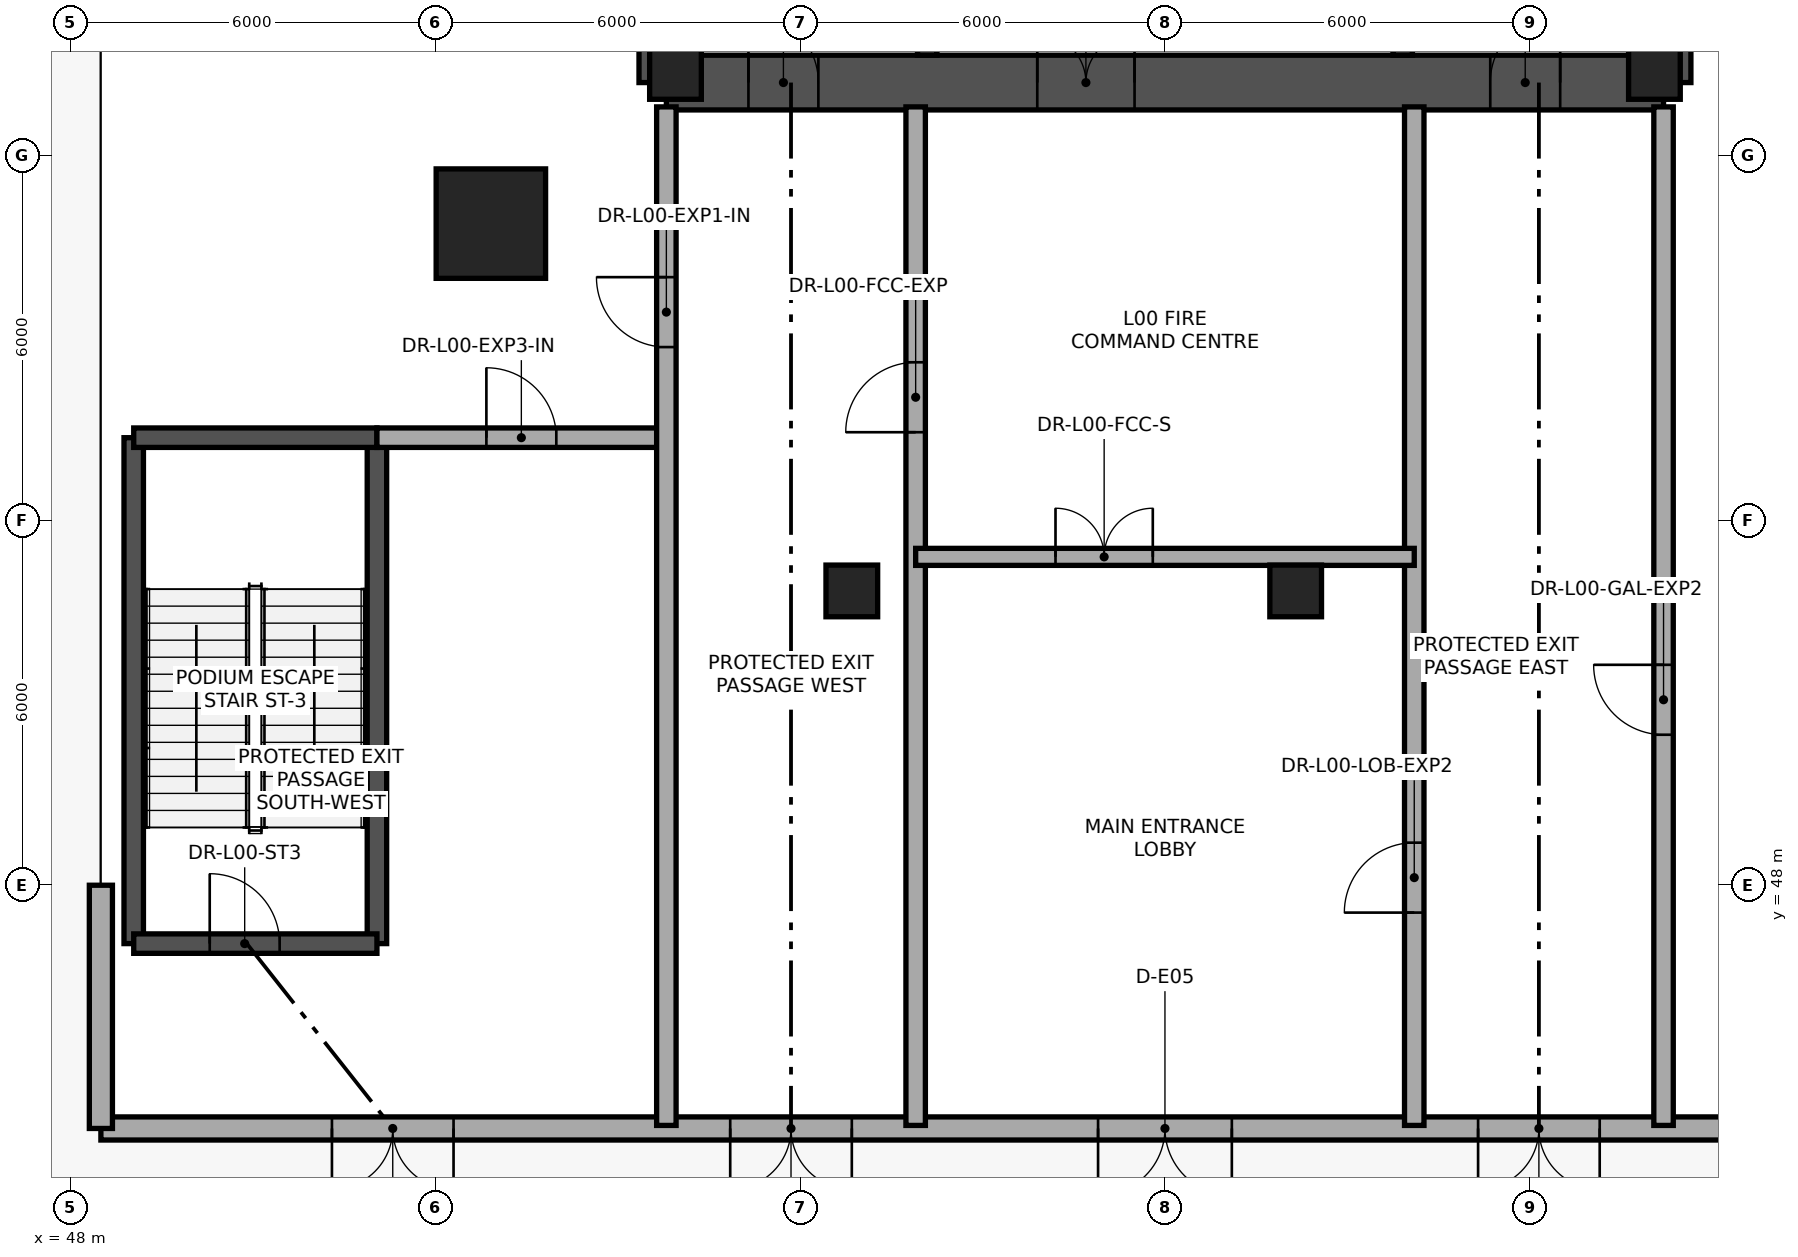
"""IFC4 building model, lengths in metres.
Left out: names, types, materials, properties, quantities, classifications, styles, units other than length and angle.
Written with IfcOpenShell. Run it as: python <this file> out.ifc"""

import sys

from ifc_helpers import new_model, si_unit, direction, frame, frame_2d, origin, origin_2d, place, context, subcontext, project, spatial, rectangle, extrude, element, fill, save


model = new_model("IFC4")
c1 = context("Model", 3, precision=1e-05, world=origin(), true_north=direction((0.0, 1.0)))
c2 = subcontext(c1, "Body", "Model", "MODEL_VIEW")
j1 = project(units=[si_unit("LENGTHUNIT", "METRE"), si_unit("PLANEANGLEUNIT", "RADIAN")], contexts=[c1])
p1 = place(None, origin())
s1 = spatial("IfcSite", under=j1, at=p1, CompositionType="ELEMENT")
p2 = place(p1, origin())
s2 = spatial("IfcBuilding", under=s1, at=p2, CompositionType="ELEMENT")
p3 = place(p2, origin())
s3 = spatial("IfcBuildingStorey", under=s2, at=p3, CompositionType="ELEMENT", Elevation=0.0)
p4 = place(p3, frame((57.8, 61.2, 0.0), z_axis=(0.0, 0.0, 1.0), x_axis=(1.0, 0.0, 0.0)))
e1 = element("IfcWall", 1, at=p4, inside=s3, PredefinedType="SHEAR", context=c2, shape_type="SweptSolid", body=[
    extrude(rectangle(XDim=16.4, YDim=0.9, at=frame_2d((8.2, 0.0))), origin(), (0.0, 0.0, 1.0), 5.4),
])
p5 = place(p4, frame((1.35, 0.0, 0.0)))
e2 = element("IfcOpeningElement", 2, at=p5, cuts=e1, PredefinedType="OPENING", context=c2, shape_type="SweptSolid", body=[
    extrude(rectangle(XDim=1.15, YDim=2.15, at=frame_2d((0.575, 1.075))), frame((0.0, 0.46, 0.0), z_axis=(0.0, -1.0, 0.0), x_axis=(1.0, 0.0, 0.0)), (0.0, 0.0, 1.0), 0.92),
])
p6 = place(p4, frame((6.1, 0.0, 0.0)))
e3 = element("IfcOpeningElement", 3, at=p6, cuts=e1, PredefinedType="OPENING", context=c2, shape_type="SweptSolid", body=[
    extrude(rectangle(XDim=1.6, YDim=2.15, at=frame_2d((0.8, 1.075))), frame((0.0, 0.46, 0.0), z_axis=(0.0, -1.0, 0.0), x_axis=(1.0, 0.0, 0.0)), (0.0, 0.0, 1.0), 0.92),
])
p7 = place(p4, frame((13.55, 0.0, 0.0)))
e4 = element("IfcOpeningElement", 4, at=p7, cuts=e1, PredefinedType="OPENING", context=c2, shape_type="SweptSolid", body=[
    extrude(rectangle(XDim=1.15, YDim=2.15, at=frame_2d((0.575, 1.075))), frame((0.0, 0.46, 0.0), z_axis=(0.0, -1.0, 0.0), x_axis=(1.0, 0.0, 0.0)), (0.0, 0.0, 1.0), 0.92),
])
p8 = place(p3, frame((74.2, 61.2, 0.0), z_axis=(0.0, 0.0, 1.0), x_axis=(0.0, 1.0, 0.0)))
e5 = element("IfcWall", 5, at=p8, inside=s3, PredefinedType="SHEAR", context=c2, shape_type="SweptSolid", body=[
    extrude(rectangle(XDim=13.6, YDim=0.9, at=frame_2d((6.8, 0.0))), origin(), (0.0, 0.0, 1.0), 5.4),
])
p9 = place(p3, frame((57.8, 74.8, 0.0), z_axis=(0.0, 0.0, 1.0), x_axis=(0.0, -1.0, 0.0)))
e6 = element("IfcWall", 6, at=p9, inside=s3, PredefinedType="SHEAR", context=c2, shape_type="SweptSolid", body=[
    extrude(rectangle(XDim=13.6, YDim=0.9, at=frame_2d((6.8, 0.0))), origin(), (0.0, 0.0, 1.0), 5.4),
])
p10 = place(p9, frame((0.85, 0.0, 0.0)))
e7 = element("IfcOpeningElement", 7, at=p10, cuts=e6, PredefinedType="OPENING", context=c2, shape_type="SweptSolid", body=[
    extrude(rectangle(XDim=0.92, YDim=2.05, at=frame_2d((0.46, 1.025))), frame((0.0, 0.46, 0.0), z_axis=(0.0, -1.0, 0.0), x_axis=(1.0, 0.0, 0.0)), (0.0, 0.0, 1.0), 0.92),
])
p11 = place(p9, frame((2.55, 0.0, 0.0)))
e8 = element("IfcOpeningElement", 8, at=p11, cuts=e6, PredefinedType="OPENING", context=c2, shape_type="SweptSolid", body=[
    extrude(rectangle(XDim=1.6, YDim=2.3, at=frame_2d((0.8, 1.15))), frame((0.0, 0.46, 0.0), z_axis=(0.0, -1.0, 0.0), x_axis=(1.0, 0.0, 0.0)), (0.0, 0.0, 1.0), 0.92),
])
p12 = place(p3, frame((62.09, 61.65, 0.0), z_axis=(0.0, 0.0, 1.0), x_axis=(0.0, 1.0, 0.0)))
e9 = element("IfcWall", 9, at=p12, inside=s3, PredefinedType="SHEAR", context=c2, shape_type="SweptSolid", body=[
    extrude(rectangle(XDim=12.7, YDim=0.32, at=frame_2d((6.35, 0.0))), origin(), (0.0, 0.0, 1.0), 5.4),
])
p13 = place(p12, frame((0.55, 0.0, 0.0)))
e10 = element("IfcOpeningElement", 10, at=p13, cuts=e9, PredefinedType="OPENING", context=c2, shape_type="SweptSolid", body=[
    extrude(rectangle(XDim=1.15, YDim=2.15, at=frame_2d((0.575, 1.075))), frame((0.0, 0.17, 0.0), z_axis=(0.0, -1.0, 0.0), x_axis=(1.0, 0.0, 0.0)), (0.0, 0.0, 1.0), 0.34),
])
p14 = place(p3, frame((69.91, 61.65, 0.0), z_axis=(0.0, 0.0, 1.0), x_axis=(0.0, 1.0, 0.0)))
e11 = element("IfcWall", 11, at=p14, inside=s3, PredefinedType="SHEAR", context=c2, shape_type="SweptSolid", body=[
    extrude(rectangle(XDim=12.7, YDim=0.32, at=frame_2d((6.35, 0.0))), origin(), (0.0, 0.0, 1.0), 5.4),
])
p15 = place(p14, frame((8.75, 0.0, 0.0)))
e12 = element("IfcOpeningElement", 12, at=p15, cuts=e11, PredefinedType="OPENING", context=c2, shape_type="SweptSolid", body=[
    extrude(rectangle(XDim=0.92, YDim=2.05, at=frame_2d((0.46, 1.025))), frame((0.0, 0.17, 0.0), z_axis=(0.0, -1.0, 0.0), x_axis=(1.0, 0.0, 0.0)), (0.0, 0.0, 1.0), 0.34),
])
for number, where, z_axis, x_axis in (
    (13, (49.04, 47.04, 0.0), (0.0, 0.0, 1.0), (0.0, 1.0, 0.0)),
    (14, (53.04, 47.04, 0.0), (0.0, 0.0, 1.0), (0.0, 1.0, 0.0)),
):
    element("IfcWall", number, at=place(p3, frame(where, z_axis=z_axis, x_axis=x_axis)), inside=s3, PredefinedType="SHEAR", context=c2, shape_type="SweptSolid", body=[
        extrude(rectangle(XDim=8.32, YDim=0.32, at=frame_2d((4.16, 0.0))), origin(), (0.0, 0.0, 1.0), 5.4),
    ])
p16 = place(p3, frame((49.04, 55.36, 0.0), z_axis=(0.0, 0.0, 1.0), x_axis=(1.0, 0.0, 0.0)))
e15 = element("IfcWall", 15, at=p16, inside=s3, PredefinedType="SHEAR", context=c2, shape_type="SweptSolid", body=[
    extrude(rectangle(XDim=4.0, YDim=0.32, at=frame_2d((2.0, 0.0))), origin(), (0.0, 0.0, 1.0), 5.4),
])
p17 = place(p3, frame((49.04, 47.04, 0.0), z_axis=(0.0, 0.0, 1.0), x_axis=(1.0, 0.0, 0.0)))
e16 = element("IfcWall", 16, at=p17, inside=s3, PredefinedType="SHEAR", context=c2, shape_type="SweptSolid", body=[
    extrude(rectangle(XDim=4.0, YDim=0.32, at=frame_2d((2.0, 0.0))), origin(), (0.0, 0.0, 1.0), 5.4),
])
p18 = place(p17, frame((1.25, 0.0, 0.0)))
e17 = element("IfcOpeningElement", 17, at=p18, cuts=e16, PredefinedType="OPENING", context=c2, shape_type="SweptSolid", body=[
    extrude(rectangle(XDim=1.15, YDim=2.15, at=frame_2d((0.575, 1.075))), frame((0.0, 0.17, 0.0), z_axis=(0.0, -1.0, 0.0), x_axis=(1.0, 0.0, 0.0)), (0.0, 0.0, 1.0), 0.34),
])
for number, where, z_axis, x_axis in (
    (18, (57.95, 61.35, 0.0), (0.0, 0.0, 1.0), (1.0, 0.0, 0.0)),
    (19, (74.05, 61.35, 0.0), (0.0, 0.0, 1.0), (1.0, 0.0, 0.0)),
    (20, (60.85, 52.84, 0.0), (0.0, 0.0, 1.0), (1.0, 0.0, 0.0)),
    (21, (68.15, 52.84, 0.0), (0.0, 0.0, 1.0), (1.0, 0.0, 0.0)),
):
    element("IfcColumn", number, at=place(p3, frame(where, z_axis=z_axis, x_axis=x_axis)), inside=s3, PredefinedType="COLUMN", context=c2, shape_type="SweptSolid", body=[
        extrude(rectangle(XDim=0.85, YDim=0.85, at=origin_2d()), origin(), (0.0, 0.0, 1.0), 5.4),
    ])
p19 = place(p3, frame((54.914, 58.88, 0.0), z_axis=(0.0, 0.0, 1.0), x_axis=(1.0, 0.0, 0.0)))
e22 = element("IfcColumn", 22, at=p19, inside=s3, PredefinedType="COLUMN", context=c2, shape_type="SweptSolid", body=[
    extrude(rectangle(XDim=1.8, YDim=1.8, at=origin_2d()), origin(), (0.0, 0.0, 1.0), 5.4),
])
p20 = place(p3, frame((83.5, 44.0, 0.0), z_axis=(0.0, 0.0, 1.0), x_axis=(-1.0, 0.0, 0.0)))
e23 = element("IfcWall", 23, at=p20, inside=s3, PredefinedType="STANDARD", context=c2, shape_type="SweptSolid", body=[
    extrude(rectangle(XDim=35.0, YDim=0.38, at=frame_2d((17.5, 0.0))), origin(), (0.0, 0.0, 1.0), 4.08),
])
p21 = place(p20, frame((3.5, 0.0, 0.0)))
e24 = element("IfcOpeningElement", 24, at=p21, cuts=e23, PredefinedType="OPENING", context=c2, shape_type="SweptSolid", body=[
    extrude(rectangle(XDim=2.0, YDim=2.25, at=frame_2d((1.0, 1.125))), frame((0.0, 0.2, 0.0), z_axis=(0.0, -1.0, 0.0), x_axis=(1.0, 0.0, 0.0)), (0.0, 0.0, 1.0), 0.4),
])
p22 = place(p20, frame((10.35, 0.0, 0.0)))
e25 = element("IfcOpeningElement", 25, at=p22, cuts=e23, PredefinedType="OPENING", context=c2, shape_type="SweptSolid", body=[
    extrude(rectangle(XDim=2.0, YDim=2.25, at=frame_2d((1.0, 1.125))), frame((0.0, 0.2, 0.0), z_axis=(0.0, -1.0, 0.0), x_axis=(1.0, 0.0, 0.0)), (0.0, 0.0, 1.0), 0.4),
])
p23 = place(p20, frame((16.4, 0.0, 0.0)))
e26 = element("IfcOpeningElement", 26, at=p23, cuts=e23, PredefinedType="OPENING", context=c2, shape_type="SweptSolid", body=[
    extrude(rectangle(XDim=2.2, YDim=2.6, at=frame_2d((1.1, 1.3))), frame((0.0, 0.2, 0.0), z_axis=(0.0, -1.0, 0.0), x_axis=(1.0, 0.0, 0.0)), (0.0, 0.0, 1.0), 0.4),
])
p24 = place(p20, frame((22.65, 0.0, 0.0)))
e27 = element("IfcOpeningElement", 27, at=p24, cuts=e23, PredefinedType="OPENING", context=c2, shape_type="SweptSolid", body=[
    extrude(rectangle(XDim=2.0, YDim=2.25, at=frame_2d((1.0, 1.125))), frame((0.0, 0.2, 0.0), z_axis=(0.0, -1.0, 0.0), x_axis=(1.0, 0.0, 0.0)), (0.0, 0.0, 1.0), 0.4),
])
p25 = place(p20, frame((29.2, 0.0, 0.0)))
e28 = element("IfcOpeningElement", 28, at=p25, cuts=e23, PredefinedType="OPENING", context=c2, shape_type="SweptSolid", body=[
    extrude(rectangle(XDim=2.0, YDim=2.25, at=frame_2d((1.0, 1.125))), frame((0.0, 0.2, 0.0), z_axis=(0.0, -1.0, 0.0), x_axis=(1.0, 0.0, 0.0)), (0.0, 0.0, 1.0), 0.4),
])
p26 = place(p3, frame((48.5, 44.0, 0.0), z_axis=(0.0, 0.0, 1.0), x_axis=(0.0, 1.0, 0.0)))
e29 = element("IfcWall", 29, at=p26, inside=s3, PredefinedType="STANDARD", context=c2, shape_type="SweptSolid", body=[
    extrude(rectangle(XDim=4.0, YDim=0.38, at=frame_2d((2.0, 0.0))), origin(), (0.0, 0.0, 1.0), 4.03),
])
p27 = place(p3, frame((53.04, 55.36, 0.0), z_axis=(0.0, 0.0, 1.0), x_axis=(1.0, 0.0, 0.0)))
e30 = element("IfcWall", 30, at=p27, inside=s3, PredefinedType="STANDARD", context=c2, shape_type="SweptSolid", body=[
    extrude(rectangle(XDim=4.76, YDim=0.32, at=frame_2d((2.38, 0.0))), origin(), (0.0, 0.0, 1.0), 4.08),
])
p28 = place(p27, frame((1.8, 0.0, 0.0)))
e31 = element("IfcOpeningElement", 31, at=p28, cuts=e30, PredefinedType="OPENING", context=c2, shape_type="SweptSolid", body=[
    extrude(rectangle(XDim=1.15, YDim=2.15, at=frame_2d((0.575, 1.075))), frame((0.0, 0.17, 0.0), z_axis=(0.0, -1.0, 0.0), x_axis=(1.0, 0.0, 0.0)), (0.0, 0.0, 1.0), 0.34),
])
p29 = place(p3, frame((57.8, 44.05, 0.0), z_axis=(0.0, 0.0, 1.0), x_axis=(0.0, 1.0, 0.0)))
e32 = element("IfcWall", 32, at=p29, inside=s3, PredefinedType="STANDARD", context=c2, shape_type="SweptSolid", body=[
    extrude(rectangle(XDim=16.75, YDim=0.32, at=frame_2d((8.375, 0.0))), origin(), (0.0, 0.0, 1.0), 4.08),
])
p30 = place(p29, frame((12.8, 0.0, 0.0)))
e33 = element("IfcOpeningElement", 33, at=p30, cuts=e32, PredefinedType="OPENING", context=c2, shape_type="SweptSolid", body=[
    extrude(rectangle(XDim=1.15, YDim=2.15, at=frame_2d((0.575, 1.075))), frame((0.0, 0.17, 0.0), z_axis=(0.0, -1.0, 0.0), x_axis=(1.0, 0.0, 0.0)), (0.0, 0.0, 1.0), 0.34),
])
p31 = place(p3, frame((61.9, 44.05, 0.0), z_axis=(0.0, 0.0, 1.0), x_axis=(0.0, 1.0, 0.0)))
e34 = element("IfcWall", 34, at=p31, inside=s3, PredefinedType="STANDARD", context=c2, shape_type="SweptSolid", body=[
    extrude(rectangle(XDim=16.75, YDim=0.32, at=frame_2d((8.375, 0.0))), origin(), (0.0, 0.0, 1.0), 4.08),
])
p32 = place(p31, frame((11.4, 0.0, 0.0)))
e35 = element("IfcOpeningElement", 35, at=p32, cuts=e34, PredefinedType="OPENING", context=c2, shape_type="SweptSolid", body=[
    extrude(rectangle(XDim=1.15, YDim=2.15, at=frame_2d((0.575, 1.075))), frame((0.0, 0.17, 0.0), z_axis=(0.0, -1.0, 0.0), x_axis=(1.0, 0.0, 0.0)), (0.0, 0.0, 1.0), 0.34),
])
p33 = place(p3, frame((70.1, 44.05, 0.0), z_axis=(0.0, 0.0, 1.0), x_axis=(0.0, 1.0, 0.0)))
e36 = element("IfcWall", 36, at=p33, inside=s3, PredefinedType="STANDARD", context=c2, shape_type="SweptSolid", body=[
    extrude(rectangle(XDim=16.75, YDim=0.32, at=frame_2d((8.375, 0.0))), origin(), (0.0, 0.0, 1.0), 4.08),
])
p34 = place(p33, frame((3.5, 0.0, 0.0)))
e37 = element("IfcOpeningElement", 37, at=p34, cuts=e36, PredefinedType="OPENING", context=c2, shape_type="SweptSolid", body=[
    extrude(rectangle(XDim=1.15, YDim=2.15, at=frame_2d((0.575, 1.075))), frame((0.0, 0.17, 0.0), z_axis=(0.0, -1.0, 0.0), x_axis=(1.0, 0.0, 0.0)), (0.0, 0.0, 1.0), 0.34),
])
p35 = place(p3, frame((74.2, 44.05, 0.0), z_axis=(0.0, 0.0, 1.0), x_axis=(0.0, 1.0, 0.0)))
e38 = element("IfcWall", 38, at=p35, inside=s3, PredefinedType="STANDARD", context=c2, shape_type="SweptSolid", body=[
    extrude(rectangle(XDim=16.75, YDim=0.32, at=frame_2d((8.375, 0.0))), origin(), (0.0, 0.0, 1.0), 4.08),
])
p36 = place(p35, frame((6.425, 0.0, 0.0)))
e39 = element("IfcOpeningElement", 39, at=p36, cuts=e38, PredefinedType="OPENING", context=c2, shape_type="SweptSolid", body=[
    extrude(rectangle(XDim=1.15, YDim=2.15, at=frame_2d((0.575, 1.075))), frame((0.0, 0.17, 0.0), z_axis=(0.0, -1.0, 0.0), x_axis=(1.0, 0.0, 0.0)), (0.0, 0.0, 1.0), 0.34),
])
p37 = place(p3, frame((61.9, 53.4, 0.0), z_axis=(0.0, 0.0, 1.0), x_axis=(1.0, 0.0, 0.0)))
e40 = element("IfcWall", 40, at=p37, inside=s3, PredefinedType="STANDARD", context=c2, shape_type="SweptSolid", body=[
    extrude(rectangle(XDim=8.2, YDim=0.28, at=frame_2d((4.1, 0.0))), origin(), (0.0, 0.0, 1.0), 4.08),
])
p38 = place(p37, frame((2.3, 0.0, 0.0)))
e41 = element("IfcOpeningElement", 41, at=p38, cuts=e40, PredefinedType="OPENING", context=c2, shape_type="SweptSolid", body=[
    extrude(rectangle(XDim=1.6, YDim=2.15, at=frame_2d((0.8, 1.075))), frame((0.0, 0.15, 0.0), z_axis=(0.0, -1.0, 0.0), x_axis=(1.0, 0.0, 0.0)), (0.0, 0.0, 1.0), 0.3),
])
p39 = place(p22, origin())
e42 = element("IfcDoor", 42, at=p39, inside=s3, OperationType="DOUBLE_DOOR_SINGLE_SWING", PredefinedType="DOOR", context=c2, shape_type="SweptSolid", body=[
    extrude(rectangle(XDim=2.0, YDim=2.25, at=frame_2d((1.0, 1.125))), frame((0.0, 0.025, 0.0), z_axis=(0.0, -1.0, 0.0), x_axis=(1.0, 0.0, 0.0)), (0.0, 0.0, 1.0), 0.05),
])
fill(e25, e42)
p40 = place(p23, origin())
e43 = element("IfcDoor", 43, at=p40, inside=s3, OperationType="DOUBLE_DOOR_SINGLE_SWING", PredefinedType="DOOR", context=c2, shape_type="SweptSolid", body=[
    extrude(rectangle(XDim=2.2, YDim=2.6, at=frame_2d((1.1, 1.3))), frame((0.0, 0.025, 0.0), z_axis=(0.0, -1.0, 0.0), x_axis=(1.0, 0.0, 0.0)), (0.0, 0.0, 1.0), 0.05),
])
fill(e26, e43)
p41 = place(p24, origin())
e44 = element("IfcDoor", 44, at=p41, inside=s3, OperationType="DOUBLE_DOOR_SINGLE_SWING", PredefinedType="DOOR", context=c2, shape_type="SweptSolid", body=[
    extrude(rectangle(XDim=2.0, YDim=2.25, at=frame_2d((1.0, 1.125))), frame((0.0, 0.025, 0.0), z_axis=(0.0, -1.0, 0.0), x_axis=(1.0, 0.0, 0.0)), (0.0, 0.0, 1.0), 0.05),
])
fill(e27, e44)
p42 = place(p25, origin())
e45 = element("IfcDoor", 45, at=p42, inside=s3, OperationType="DOUBLE_DOOR_SINGLE_SWING", PredefinedType="DOOR", context=c2, shape_type="SweptSolid", body=[
    extrude(rectangle(XDim=2.0, YDim=2.25, at=frame_2d((1.0, 1.125))), frame((0.0, 0.025, 0.0), z_axis=(0.0, -1.0, 0.0), x_axis=(1.0, 0.0, 0.0)), (0.0, 0.0, 1.0), 0.05),
])
fill(e28, e45)
p43 = place(p5, origin())
e46 = element("IfcDoor", 46, at=p43, inside=s3, OperationType="SINGLE_SWING_LEFT", PredefinedType="DOOR", context=c2, shape_type="SweptSolid", body=[
    extrude(rectangle(XDim=1.15, YDim=2.15, at=frame_2d((0.575, 1.075))), frame((0.0, 0.025, 0.0), z_axis=(0.0, -1.0, 0.0), x_axis=(1.0, 0.0, 0.0)), (0.0, 0.0, 1.0), 0.05),
])
fill(e2, e46)
p44 = place(p6, origin())
e47 = element("IfcDoor", 47, at=p44, inside=s3, OperationType="DOUBLE_DOOR_SINGLE_SWING", PredefinedType="DOOR", context=c2, shape_type="SweptSolid", body=[
    extrude(rectangle(XDim=1.6, YDim=2.15, at=frame_2d((0.8, 1.075))), frame((0.0, 0.025, 0.0), z_axis=(0.0, -1.0, 0.0), x_axis=(1.0, 0.0, 0.0)), (0.0, 0.0, 1.0), 0.05),
])
fill(e3, e47)
p45 = place(p7, origin())
e48 = element("IfcDoor", 48, at=p45, inside=s3, OperationType="SINGLE_SWING_RIGHT", PredefinedType="DOOR", context=c2, shape_type="SweptSolid", body=[
    extrude(rectangle(XDim=1.15, YDim=2.15, at=frame_2d((0.575, 1.075))), frame((0.0, 0.025, 0.0), z_axis=(0.0, -1.0, 0.0), x_axis=(1.0, 0.0, 0.0)), (0.0, 0.0, 1.0), 0.05),
])
fill(e4, e48)
p46 = place(p18, origin())
e49 = element("IfcDoor", 49, at=p46, inside=s3, OperationType="SINGLE_SWING_LEFT", PredefinedType="DOOR", context=c2, shape_type="SweptSolid", body=[
    extrude(rectangle(XDim=1.15, YDim=2.15, at=frame_2d((0.575, 1.075))), frame((0.0, 0.025, 0.0), z_axis=(0.0, -1.0, 0.0), x_axis=(1.0, 0.0, 0.0)), (0.0, 0.0, 1.0), 0.05),
])
fill(e17, e49)
p47 = place(p28, origin())
e50 = element("IfcDoor", 50, at=p47, inside=s3, OperationType="SINGLE_SWING_LEFT", PredefinedType="DOOR", context=c2, shape_type="SweptSolid", body=[
    extrude(rectangle(XDim=1.15, YDim=2.15, at=frame_2d((0.575, 1.075))), frame((0.0, 0.025, 0.0), z_axis=(0.0, -1.0, 0.0), x_axis=(1.0, 0.0, 0.0)), (0.0, 0.0, 1.0), 0.05),
])
fill(e31, e50)
p48 = place(p30, origin())
e51 = element("IfcDoor", 51, at=p48, inside=s3, OperationType="SINGLE_SWING_RIGHT", PredefinedType="DOOR", context=c2, shape_type="SweptSolid", body=[
    extrude(rectangle(XDim=1.15, YDim=2.15, at=frame_2d((0.575, 1.075))), frame((0.0, 0.025, 0.0), z_axis=(0.0, -1.0, 0.0), x_axis=(1.0, 0.0, 0.0)), (0.0, 0.0, 1.0), 0.05),
])
fill(e33, e51)
p49 = place(p32, origin())
e52 = element("IfcDoor", 52, at=p49, inside=s3, OperationType="SINGLE_SWING_LEFT", PredefinedType="DOOR", context=c2, shape_type="SweptSolid", body=[
    extrude(rectangle(XDim=1.15, YDim=2.15, at=frame_2d((0.575, 1.075))), frame((0.0, 0.025, 0.0), z_axis=(0.0, -1.0, 0.0), x_axis=(1.0, 0.0, 0.0)), (0.0, 0.0, 1.0), 0.05),
])
fill(e35, e52)
p50 = place(p34, origin())
e53 = element("IfcDoor", 53, at=p50, inside=s3, OperationType="SINGLE_SWING_LEFT", PredefinedType="DOOR", context=c2, shape_type="SweptSolid", body=[
    extrude(rectangle(XDim=1.15, YDim=2.15, at=frame_2d((0.575, 1.075))), frame((0.0, 0.025, 0.0), z_axis=(0.0, -1.0, 0.0), x_axis=(1.0, 0.0, 0.0)), (0.0, 0.0, 1.0), 0.05),
])
fill(e37, e53)
p51 = place(p36, origin())
e54 = element("IfcDoor", 54, at=p51, inside=s3, OperationType="SINGLE_SWING_RIGHT", PredefinedType="DOOR", context=c2, shape_type="SweptSolid", body=[
    extrude(rectangle(XDim=1.15, YDim=2.15, at=frame_2d((0.575, 1.075))), frame((0.0, 0.025, 0.0), z_axis=(0.0, -1.0, 0.0), x_axis=(1.0, 0.0, 0.0)), (0.0, 0.0, 1.0), 0.05),
])
fill(e39, e54)
p52 = place(p38, origin())
e55 = element("IfcDoor", 55, at=p52, inside=s3, OperationType="DOUBLE_DOOR_SINGLE_SWING", PredefinedType="DOOR", context=c2, shape_type="SweptSolid", body=[
    extrude(rectangle(XDim=1.6, YDim=2.15, at=frame_2d((0.8, 1.075))), frame((0.0, 0.025, 0.0), z_axis=(0.0, -1.0, 0.0), x_axis=(1.0, 0.0, 0.0)), (0.0, 0.0, 1.0), 0.05),
])
fill(e41, e55)
save(model, sys.argv[1])
